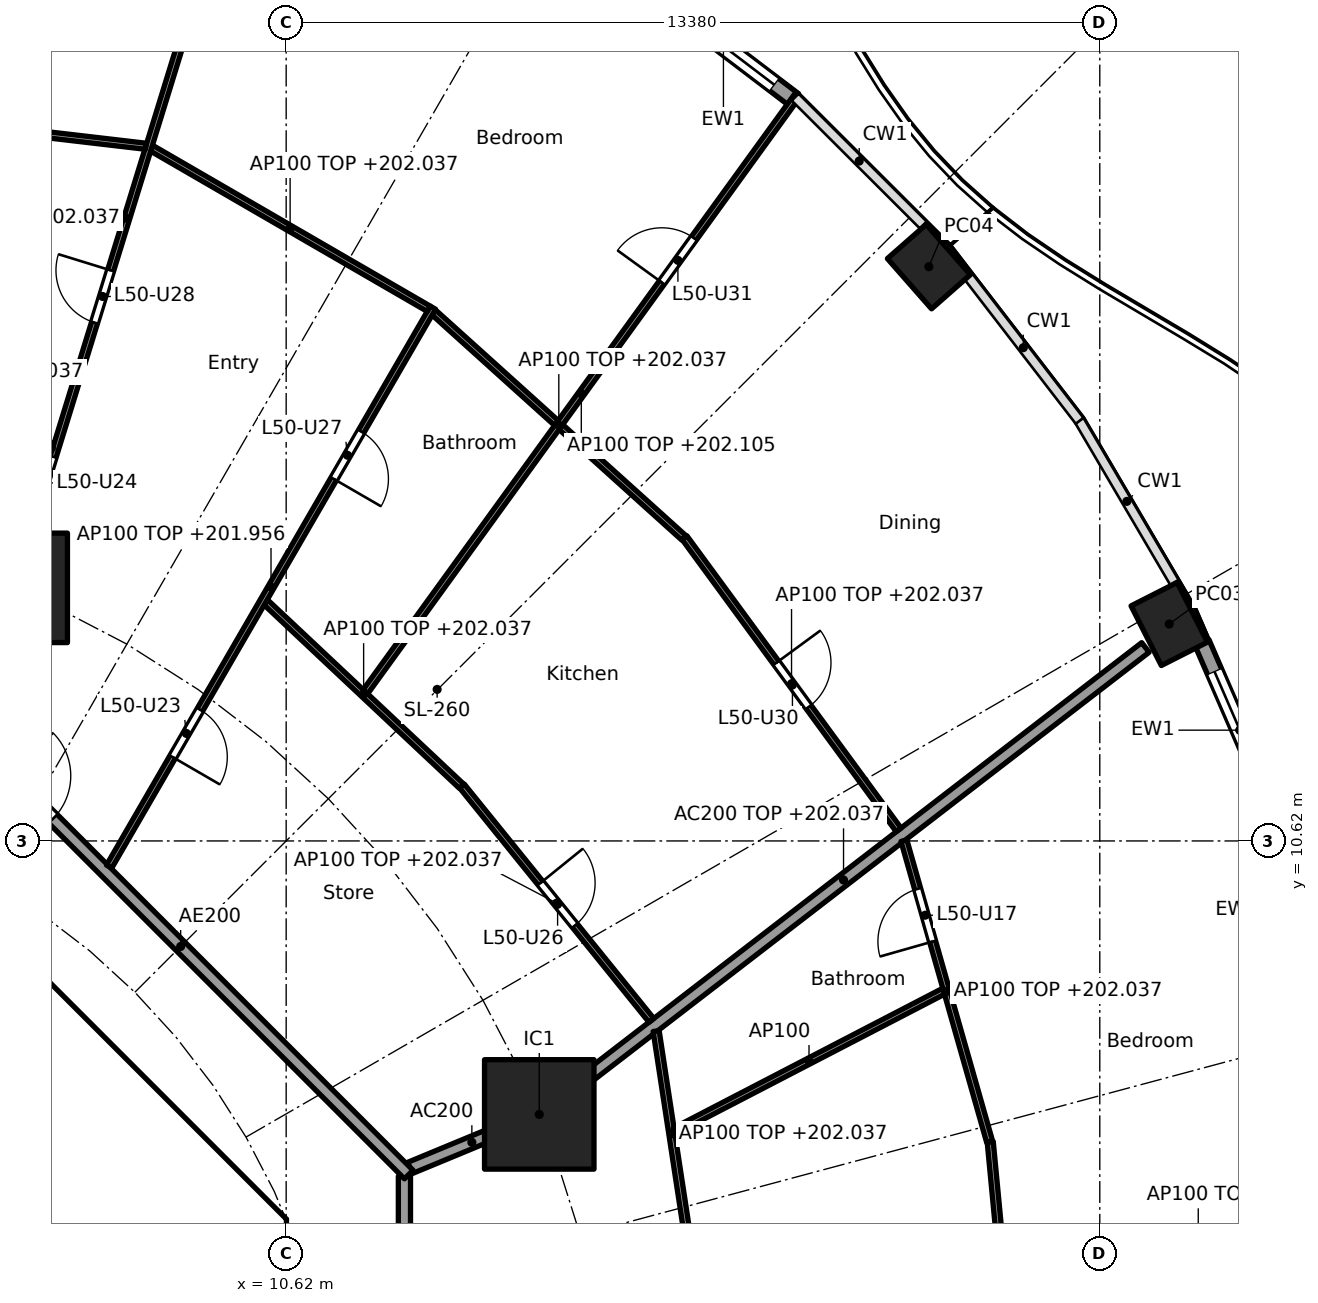
"""IFC4 building model, lengths in metres.
Left out: names, types, materials, properties, quantities, classifications, styles, units other than length and angle.
Written with IfcOpenShell. Run it as: python <this file> out.ifc"""

import sys

from ifc_helpers import new_model, si_unit, direction, frame, frame_2d, origin, origin_2d, place, context, subcontext, project, spatial, polyline, rectangle, hollow_rectangle, outline, extrude, element, fill, save


model = new_model("IFC4")
c1 = context("Model", 3, precision=1e-05, world=origin(), true_north=direction((0.0, 1.0)))
c2 = subcontext(c1, "Body", "Model", "MODEL_VIEW")
j1 = project(units=[si_unit("LENGTHUNIT", "METRE"), si_unit("PLANEANGLEUNIT", "RADIAN")], contexts=[c1])
p1 = place(None, origin())
s1 = spatial("IfcSite", under=j1, at=p1, CompositionType="ELEMENT")
p2 = place(p1, origin())
s2 = spatial("IfcBuilding", under=s1, at=p2, CompositionType="ELEMENT")
p3 = place(p2, frame((0.0, 0.0, 199.2)))
s3 = spatial("IfcBuildingStorey", under=s2, at=p3, CompositionType="ELEMENT", Elevation=199.2)
for number, where, z_axis, x_axis in (
    (1, (25.142, 14.188, 0.0), (0.0, 0.0, 1.0), (-0.452, 0.892, 0.0)),
    (2, (21.189, 20.064, 0.0), (0.0, 0.0, 1.0), (-0.66, 0.751, 0.0)),
):
    element("IfcColumn", number, at=place(p3, frame(where, z_axis=z_axis, x_axis=x_axis)), inside=s3, PredefinedType="COLUMN", context=c2, shape_type="SweptSolid", body=[
        extrude(hollow_rectangle(XDim=1.1, YDim=0.85, WallThickness=0.036, at=origin_2d()), origin(), (0.0, 0.0, 1.0), 3.7),
    ])
for number, where, z_axis, x_axis in (
    (3, (14.782, 6.123, 0.0), (0.0, 0.0, 1.0), (1.0, 0.0, 0.0)),
    (4, (6.123, 14.782, 0.0), (0.0, 0.0, 1.0), (1.0, 0.0, 0.0)),
):
    element("IfcColumn", number, at=place(p3, frame(where, z_axis=z_axis, x_axis=x_axis)), inside=s3, PredefinedType="COLUMN", context=c2, shape_type="SweptSolid", body=[
        extrude(rectangle(XDim=1.8, YDim=1.8, at=origin_2d()), origin(), (0.0, 0.0, 1.0), 3.7),
    ])
p4 = place(p3, frame((25.679, 13.883, 0.0), z_axis=(0.0, 0.0, 1.0), x_axis=(0.397620521824, -0.917549955384, 0.0)))
e5 = element("IfcWall", 5, at=p4, inside=s3, PredefinedType="SOLIDWALL", context=c2, shape_type="SweptSolid", body=[
    extrude(rectangle(XDim=3.142, YDim=0.25, at=frame_2d((1.571, 0.0))), origin(), (0.0, 0.0, 1.0), 3.44),
])
p5 = place(p4, frame((0.521, 0.0, 0.0)))
e6 = element("IfcOpeningElement", 6, at=p5, cuts=e5, PredefinedType="OPENING", context=c2, shape_type="SweptSolid", body=[
    extrude(rectangle(XDim=2.1, YDim=2.4, at=frame_2d((1.05, 1.2))), frame((0.0, 0.135, 0.0), z_axis=(0.0, -1.0, 0.0), x_axis=(1.0, 0.0, 0.0)), (0.0, 0.0, 1.0), 0.27),
])
p6 = place(p3, frame((16.65, 24.574, 0.0), z_axis=(0.0, 0.0, 1.0), x_axis=(0.796055733703, -0.60522332146, 0.0)))
e7 = element("IfcWall", 7, at=p6, inside=s3, PredefinedType="SOLIDWALL", context=c2, shape_type="SweptSolid", body=[
    extrude(rectangle(XDim=2.917, YDim=0.25, at=frame_2d((1.458, 0.0))), origin(), (0.0, 0.0, 1.0), 3.44),
])
p7 = place(p6, frame((0.408, 0.0, 0.0)))
e8 = element("IfcOpeningElement", 8, at=p7, cuts=e7, PredefinedType="OPENING", context=c2, shape_type="SweptSolid", body=[
    extrude(rectangle(XDim=2.1, YDim=2.4, at=frame_2d((1.05, 1.2))), frame((0.0, 0.135, 0.0), z_axis=(0.0, -1.0, 0.0), x_axis=(1.0, 0.0, 0.0)), (0.0, 0.0, 1.0), 0.27),
])
p8 = place(p3, frame((9.988, 4.613, 0.0), z_axis=(0.0, 0.0, 1.0), x_axis=(-0.707106781187, 0.707106781187, 0.0)))
e9 = element("IfcWall", 9, at=p8, inside=s3, PredefinedType="SHEAR", context=c2, shape_type="SweptSolid", body=[
    extrude(rectangle(XDim=7.602, YDim=0.6, at=frame_2d((3.801, 0.0))), origin(), (0.0, 0.0, 1.0), 3.44),
])
p9 = place(p8, frame((3.201, 0.0, 0.0)))
e10 = element("IfcOpeningElement", 10, at=p9, cuts=e9, PredefinedType="OPENING", context=c2, shape_type="SweptSolid", body=[
    extrude(rectangle(XDim=1.2, YDim=2.1, at=frame_2d((0.6, 1.05))), frame((0.0, 0.31, 0.0), z_axis=(0.0, -1.0, 0.0), x_axis=(1.0, 0.0, 0.0)), (0.0, 0.0, 1.0), 0.62),
])
p10 = place(p3, origin())
e11 = element("IfcWall", 11, at=p10, inside=s3, PredefinedType="SHEAR", context=c2, shape_type="SweptSolid", body=[
    extrude(outline(polyline([(9.776, -4.401), (10.025, -4.152), (10.025, -3.801), (10.025, 4.152), (9.776, 4.401), (10.2, 4.825), (10.625, 4.401), (10.625, -4.401), (10.2, -4.825), (9.776, -4.401)])), origin(), (0.0, 0.0, 1.0), 3.44),
])
p11 = place(p3, frame((12.657, 5.243, 0.0), z_axis=(0.0, 0.0, 1.0), x_axis=(0.92383017907, 0.382802560388, 0.0)))
e12 = element("IfcWall", 12, at=p11, inside=s3, PredefinedType="PARTITIONING", context=c2, shape_type="SweptSolid", body=[
    extrude(rectangle(XDim=2.2, YDim=0.2, at=frame_2d((1.1, 0.0))), origin(), (0.0, 0.0, 1.0), 3.44),
])
p12 = place(p3, frame((14.822, 6.154, 0.0), z_axis=(0.0, 0.0, 1.0), x_axis=(0.792203056092, 0.610257583254, 0.0)))
e13 = element("IfcWall", 13, at=p12, inside=s3, PredefinedType="PARTITIONING", context=c2, shape_type="SweptSolid", body=[
    extrude(rectangle(XDim=12.533, YDim=0.2, at=frame_2d((6.266, 0.0))), origin(), (0.0, 0.0, 1.0), 2.837),
])
p13 = place(p3, frame((12.565, -5.104, 0.0), z_axis=(0.0, 0.0, 1.0), x_axis=(0.0, 1.0, 0.0)))
e14 = element("IfcWall", 14, at=p13, inside=s3, PredefinedType="PARTITIONING", context=c2, shape_type="SweptSolid", body=[
    extrude(rectangle(XDim=10.209, YDim=0.2, at=frame_2d((5.104, 0.0))), origin(), (0.0, 0.0, 1.0), 3.44),
])
p14 = place(p3, frame((12.635, 5.134, 0.0), z_axis=(0.0, 0.0, 1.0), x_axis=(-0.707106781187, 0.707106781187, 0.0)))
e15 = element("IfcWall", 15, at=p14, inside=s3, PredefinedType="PARTITIONING", context=c2, shape_type="SweptSolid", body=[
    extrude(rectangle(XDim=10.609, YDim=0.2, at=frame_2d((5.305, 0.0))), origin(), (0.0, 0.0, 1.0), 3.44),
])
p15 = place(p14, frame((8.274, 0.0, 0.0)))
e16 = element("IfcOpeningElement", 16, at=p15, cuts=e15, PredefinedType="OPENING", context=c2, shape_type="SweptSolid", body=[
    extrude(rectangle(XDim=1.0, YDim=2.1, at=frame_2d((0.5, 1.05))), frame((0.0, 0.11, 0.0), z_axis=(0.0, -1.0, 0.0), x_axis=(1.0, 0.0, 0.0)), (0.0, 0.0, 1.0), 0.22),
])
p16 = place(p3, frame((22.734, 0.05, 0.0), z_axis=(0.0, 0.0, 1.0), x_axis=(-0.0949274088, 0.995484197292, 0.0)))
e17 = element("IfcWall", 17, at=p16, inside=s3, PredefinedType="PARTITIONING", context=c2, shape_type="SweptSolid", body=[
    extrude(rectangle(XDim=5.648, YDim=0.1, at=frame_2d((2.824, 0.0))), origin(), (0.0, 0.0, 1.0), 2.837),
])
p17 = place(p16, frame((0.937, 0.0, 0.0)))
e18 = element("IfcOpeningElement", 18, at=p17, cuts=e17, PredefinedType="OPENING", context=c2, shape_type="SweptSolid", body=[
    extrude(rectangle(XDim=0.9, YDim=2.1, at=frame_2d((0.45, 1.05))), frame((0.0, 0.06, 0.0), z_axis=(0.0, -1.0, 0.0), x_axis=(1.0, 0.0, 0.0)), (0.0, 0.0, 1.0), 0.12),
])
p18 = place(p3, frame((17.221, 4.113, 0.0), z_axis=(0.0, 0.0, 1.0), x_axis=(-0.1510806336, 0.988521442434, 0.0)))
e19 = element("IfcWall", 19, at=p18, inside=s3, PredefinedType="PARTITIONING", context=c2, shape_type="SweptSolid", body=[
    extrude(rectangle(XDim=3.419, YDim=0.1, at=frame_2d((1.71, 0.0))), origin(), (0.0, 0.0, 1.0), 2.837),
])
p19 = place(p3, frame((22.189, 5.67, 0.0), z_axis=(0.0, 0.0, 1.0), x_axis=(-0.273819702124, 0.961781040949, 0.0)))
e20 = element("IfcWall", 20, at=p19, inside=s3, PredefinedType="PARTITIONING", context=c2, shape_type="SweptSolid", body=[
    extrude(rectangle(XDim=5.152, YDim=0.1, at=frame_2d((2.576, 0.0))), origin(), (0.0, 0.0, 1.0), 2.837),
])
p20 = place(p19, frame((3.426, 0.0, 0.0)))
e21 = element("IfcOpeningElement", 21, at=p20, cuts=e20, PredefinedType="OPENING", context=c2, shape_type="SweptSolid", body=[
    extrude(rectangle(XDim=0.9, YDim=2.1, at=frame_2d((0.45, 1.05))), frame((0.0, 0.06, 0.0), z_axis=(0.0, -1.0, 0.0), x_axis=(1.0, 0.0, 0.0)), (0.0, 0.0, 1.0), 0.12),
])
p21 = place(p3, frame((17.003, 5.851, 0.0), z_axis=(0.0, 0.0, 1.0), x_axis=(0.887654549419, 0.460509935719, 0.0)))
e22 = element("IfcWall", 22, at=p21, inside=s3, PredefinedType="PARTITIONING", context=c2, shape_type="SweptSolid", body=[
    extrude(rectangle(XDim=4.99, YDim=0.1, at=frame_2d((2.495, 0.0))), origin(), (0.0, 0.0, 1.0), 3.44),
])
p22 = place(p3, frame((16.626, 7.67, 0.0), z_axis=(0.0, 0.0, 1.0), x_axis=(-0.628764602857, 0.777595700987, 0.0)))
e23 = element("IfcWall", 23, at=p22, inside=s3, PredefinedType="PARTITIONING", context=c2, shape_type="SweptSolid", body=[
    extrude(rectangle(XDim=4.957, YDim=0.1, at=frame_2d((2.479, 0.0))), origin(), (0.0, 0.0, 1.0), 2.837),
])
p23 = place(p22, frame((2.004, 0.0, 0.0)))
e24 = element("IfcOpeningElement", 24, at=p23, cuts=e23, PredefinedType="OPENING", context=c2, shape_type="SweptSolid", body=[
    extrude(rectangle(XDim=0.9, YDim=2.1, at=frame_2d((0.45, 1.05))), frame((0.0, 0.06, 0.0), z_axis=(0.0, -1.0, 0.0), x_axis=(1.0, 0.0, 0.0)), (0.0, 0.0, 1.0), 0.12),
])
p24 = place(p3, frame((20.692, 10.802, 0.0), z_axis=(0.0, 0.0, 1.0), x_axis=(-0.591122127251, 0.806582066918, 0.0)))
e25 = element("IfcWall", 25, at=p24, inside=s3, PredefinedType="PARTITIONING", context=c2, shape_type="SweptSolid", body=[
    extrude(rectangle(XDim=5.96, YDim=0.1, at=frame_2d((2.98, 0.0))), origin(), (0.0, 0.0, 1.0), 2.837),
])
p25 = place(p24, frame((2.505, 0.0, 0.0)))
e26 = element("IfcOpeningElement", 26, at=p25, cuts=e25, PredefinedType="OPENING", context=c2, shape_type="SweptSolid", body=[
    extrude(rectangle(XDim=0.9, YDim=2.1, at=frame_2d((0.45, 1.05))), frame((0.0, 0.06, 0.0), z_axis=(0.0, -1.0, 0.0), x_axis=(1.0, 0.0, 0.0)), (0.0, 0.0, 1.0), 0.12),
])
p26 = place(p3, frame((13.504, 11.52, 0.0), z_axis=(0.0, 0.0, 1.0), x_axis=(-0.728885663674, 0.684635442619, 0.0)))
e27 = element("IfcWall", 27, at=p26, inside=s3, PredefinedType="PARTITIONING", context=c2, shape_type="SweptSolid", body=[
    extrude(rectangle(XDim=4.419, YDim=0.1, at=frame_2d((2.21, 0.0))), origin(), (0.0, 0.0, 1.0), 2.837),
])
p27 = place(p3, frame((17.162, 15.603, 0.0), z_axis=(0.0, 0.0, 1.0), x_axis=(-0.742790086539, 0.66952437397, 0.0)))
e28 = element("IfcWall", 28, at=p27, inside=s3, PredefinedType="PARTITIONING", context=c2, shape_type="SweptSolid", body=[
    extrude(rectangle(XDim=5.542, YDim=0.1, at=frame_2d((2.771, 0.0))), origin(), (0.0, 0.0, 1.0), 2.837),
])
p28 = place(p3, frame((11.923, 13.073, 0.0), z_axis=(0.0, 0.0, 1.0), x_axis=(0.586643945506, 0.809844973561, 0.0)))
e29 = element("IfcWall", 29, at=p28, inside=s3, PredefinedType="PARTITIONING", context=c2, shape_type="SweptSolid", body=[
    extrude(rectangle(XDim=12.104, YDim=0.1, at=frame_2d((6.052, 0.0))), origin(), (0.0, 0.0, 1.0), 2.905),
])
p29 = place(p28, frame((8.31, 0.0, 0.0)))
e30 = element("IfcOpeningElement", 30, at=p29, cuts=e29, PredefinedType="OPENING", context=c2, shape_type="SweptSolid", body=[
    extrude(rectangle(XDim=0.9, YDim=2.1, at=frame_2d((0.45, 1.05))), frame((0.0, 0.06, 0.0), z_axis=(0.0, -1.0, 0.0), x_axis=(1.0, 0.0, 0.0)), (0.0, 0.0, 1.0), 0.12),
])
p30 = place(p3, frame((7.708, 10.198, 0.0), z_axis=(0.0, 0.0, 1.0), x_axis=(0.501288100085, 0.865280440501, 0.0)))
e31 = element("IfcWall", 31, at=p30, inside=s3, PredefinedType="PARTITIONING", context=c2, shape_type="SweptSolid", body=[
    extrude(rectangle(XDim=10.623, YDim=0.1, at=frame_2d((5.312, 0.0))), origin(), (0.0, 0.0, 1.0), 2.756),
])
p31 = place(p30, frame((2.082, 0.0, 0.0)))
e32 = element("IfcOpeningElement", 32, at=p31, cuts=e31, PredefinedType="OPENING", context=c2, shape_type="SweptSolid", body=[
    extrude(rectangle(XDim=0.9, YDim=2.1, at=frame_2d((0.45, 1.05))), frame((0.0, 0.06, 0.0), z_axis=(0.0, -1.0, 0.0), x_axis=(1.0, 0.0, 0.0)), (0.0, 0.0, 1.0), 0.12),
])
p32 = place(p30, frame((7.369, 0.0, 0.0)))
e33 = element("IfcOpeningElement", 33, at=p32, cuts=e31, PredefinedType="OPENING", context=c2, shape_type="SweptSolid", body=[
    extrude(rectangle(XDim=0.9, YDim=2.1, at=frame_2d((0.45, 1.05))), frame((0.0, 0.06, 0.0), z_axis=(0.0, -1.0, 0.0), x_axis=(1.0, 0.0, 0.0)), (0.0, 0.0, 1.0), 0.12),
])
p33 = place(p3, frame((12.965, 19.371, 0.0), z_axis=(0.0, 0.0, 1.0), x_axis=(-0.865277177388, 0.501293732547, 0.0)))
e34 = element("IfcWall", 34, at=p33, inside=s3, PredefinedType="PARTITIONING", context=c2, shape_type="SweptSolid", body=[
    extrude(rectangle(XDim=5.27, YDim=0.1, at=frame_2d((2.635, 0.0))), origin(), (0.0, 0.0, 1.0), 2.837),
])
p34 = place(p3, frame((6.138, 14.83, 0.0), z_axis=(0.0, 0.0, 1.0), x_axis=(0.294818517221, 0.955553264818, 0.0)))
e35 = element("IfcWall", 35, at=p34, inside=s3, PredefinedType="PARTITIONING", context=c2, shape_type="SweptSolid", body=[
    extrude(rectangle(XDim=12.619, YDim=0.1, at=frame_2d((6.31, 0.0))), origin(), (0.0, 0.0, 1.0), 2.837),
])
p35 = place(p34, frame((1.306, 0.0, 0.0)))
e36 = element("IfcOpeningElement", 36, at=p35, cuts=e35, PredefinedType="OPENING", context=c2, shape_type="SweptSolid", body=[
    extrude(rectangle(XDim=0.9, YDim=2.1, at=frame_2d((0.45, 1.05))), frame((0.0, 0.06, 0.0), z_axis=(0.0, -1.0, 0.0), x_axis=(1.0, 0.0, 0.0)), (0.0, 0.0, 1.0), 0.12),
])
p36 = place(p34, frame((4.515, 0.0, 0.0)))
e37 = element("IfcOpeningElement", 37, at=p36, cuts=e35, PredefinedType="OPENING", context=c2, shape_type="SweptSolid", body=[
    extrude(rectangle(XDim=0.9, YDim=2.1, at=frame_2d((0.45, 1.05))), frame((0.0, 0.06, 0.0), z_axis=(0.0, -1.0, 0.0), x_axis=(1.0, 0.0, 0.0)), (0.0, 0.0, 1.0), 0.12),
])
p37 = place(p3, frame((6.791, 17.113, 0.0), z_axis=(0.0, 0.0, 1.0), x_axis=(-0.997077117727, 0.07640171009, 0.0)))
e38 = element("IfcWall", 38, at=p37, inside=s3, PredefinedType="PARTITIONING", context=c2, shape_type="SweptSolid", body=[
    extrude(rectangle(XDim=4.56, YDim=0.1, at=frame_2d((2.28, 0.0))), origin(), (0.0, 0.0, 1.0), 2.837),
])
p38 = place(p3, frame((8.312, 22.044, 0.0), z_axis=(0.0, 0.0, 1.0), x_axis=(-0.993245806382, 0.1160291692, 0.0)))
e39 = element("IfcWall", 39, at=p38, inside=s3, PredefinedType="PARTITIONING", context=c2, shape_type="SweptSolid", body=[
    extrude(rectangle(XDim=5.408, YDim=0.1, at=frame_2d((2.704, 0.0))), origin(), (0.0, 0.0, 1.0), 2.837),
])
p39 = place(p38, frame((2.254, 0.0, 0.0)))
e40 = element("IfcOpeningElement", 40, at=p39, cuts=e39, PredefinedType="OPENING", context=c2, shape_type="SweptSolid", body=[
    extrude(rectangle(XDim=0.9, YDim=2.1, at=frame_2d((0.45, 1.05))), frame((0.0, 0.06, 0.0), z_axis=(0.0, -1.0, 0.0), x_axis=(1.0, 0.0, 0.0)), (0.0, 0.0, 1.0), 0.12),
])
p40 = place(p5, origin())
e41 = element("IfcDoor", 41, at=p40, inside=s3, OperationType="SLIDING_TO_LEFT", PredefinedType="DOOR", context=c2, shape_type="SweptSolid", body=[
    extrude(rectangle(XDim=2.1, YDim=2.4, at=frame_2d((1.05, 1.2))), frame((0.0, 0.025, 0.0), z_axis=(0.0, -1.0, 0.0), x_axis=(1.0, 0.0, 0.0)), (0.0, 0.0, 1.0), 0.05),
])
fill(e6, e41)
p41 = place(p7, origin())
e42 = element("IfcDoor", 42, at=p41, inside=s3, OperationType="SLIDING_TO_LEFT", PredefinedType="DOOR", context=c2, shape_type="SweptSolid", body=[
    extrude(rectangle(XDim=2.1, YDim=2.4, at=frame_2d((1.05, 1.2))), frame((0.0, 0.025, 0.0), z_axis=(0.0, -1.0, 0.0), x_axis=(1.0, 0.0, 0.0)), (0.0, 0.0, 1.0), 0.05),
])
fill(e8, e42)
p42 = place(p9, origin())
e43 = element("IfcDoor", 43, at=p42, inside=s3, OperationType="SINGLE_SWING_RIGHT", PredefinedType="DOOR", context=c2, shape_type="SweptSolid", body=[
    extrude(rectangle(XDim=1.2, YDim=2.1, at=frame_2d((0.6, 1.05))), frame((0.0, 0.025, 0.0), z_axis=(0.0, -1.0, 0.0), x_axis=(1.0, 0.0, 0.0)), (0.0, 0.0, 1.0), 0.05),
])
fill(e10, e43)
p43 = place(p20, origin())
e44 = element("IfcDoor", 44, at=p43, inside=s3, OperationType="SINGLE_SWING_LEFT", PredefinedType="DOOR", context=c2, shape_type="SweptSolid", body=[
    extrude(rectangle(XDim=0.9, YDim=2.1, at=frame_2d((0.45, 1.05))), frame((0.0, 0.025, 0.0), z_axis=(0.0, -1.0, 0.0), x_axis=(1.0, 0.0, 0.0)), (0.0, 0.0, 1.0), 0.05),
])
fill(e21, e44)
p44 = place(p15, frame((1.0, 0.0, 0.0), x_axis=(-1.0, 0.0, 0.0)))
e45 = element("IfcDoor", 45, at=p44, inside=s3, OperationType="SINGLE_SWING_LEFT", PredefinedType="DOOR", context=c2, shape_type="SweptSolid", body=[
    extrude(rectangle(XDim=1.0, YDim=2.1, at=frame_2d((0.5, 1.05))), frame((0.0, 0.025, 0.0), z_axis=(0.0, -1.0, 0.0), x_axis=(1.0, 0.0, 0.0)), (0.0, 0.0, 1.0), 0.05),
])
fill(e16, e45)
p45 = place(p31, frame((0.9, 0.0, 0.0), x_axis=(-1.0, 0.0, 0.0)))
e46 = element("IfcDoor", 46, at=p45, inside=s3, OperationType="SINGLE_SWING_RIGHT", PredefinedType="DOOR", context=c2, shape_type="SweptSolid", body=[
    extrude(rectangle(XDim=0.9, YDim=2.1, at=frame_2d((0.45, 1.05))), frame((0.0, 0.025, 0.0), z_axis=(0.0, -1.0, 0.0), x_axis=(1.0, 0.0, 0.0)), (0.0, 0.0, 1.0), 0.05),
])
fill(e32, e46)
p46 = place(p35, origin())
e47 = element("IfcDoor", 47, at=p46, inside=s3, OperationType="SINGLE_SWING_RIGHT", PredefinedType="DOOR", context=c2, shape_type="SweptSolid", body=[
    extrude(rectangle(XDim=0.9, YDim=2.1, at=frame_2d((0.45, 1.05))), frame((0.0, 0.025, 0.0), z_axis=(0.0, -1.0, 0.0), x_axis=(1.0, 0.0, 0.0)), (0.0, 0.0, 1.0), 0.05),
])
fill(e36, e47)
p47 = place(p23, frame((0.9, 0.0, 0.0), x_axis=(-1.0, 0.0, 0.0)))
e48 = element("IfcDoor", 48, at=p47, inside=s3, OperationType="SINGLE_SWING_LEFT", PredefinedType="DOOR", context=c2, shape_type="SweptSolid", body=[
    extrude(rectangle(XDim=0.9, YDim=2.1, at=frame_2d((0.45, 1.05))), frame((0.0, 0.025, 0.0), z_axis=(0.0, -1.0, 0.0), x_axis=(1.0, 0.0, 0.0)), (0.0, 0.0, 1.0), 0.05),
])
fill(e24, e48)
p48 = place(p32, frame((0.9, 0.0, 0.0), x_axis=(-1.0, 0.0, 0.0)))
e49 = element("IfcDoor", 49, at=p48, inside=s3, OperationType="SINGLE_SWING_RIGHT", PredefinedType="DOOR", context=c2, shape_type="SweptSolid", body=[
    extrude(rectangle(XDim=0.9, YDim=2.1, at=frame_2d((0.45, 1.05))), frame((0.0, 0.025, 0.0), z_axis=(0.0, -1.0, 0.0), x_axis=(1.0, 0.0, 0.0)), (0.0, 0.0, 1.0), 0.05),
])
fill(e33, e49)
p49 = place(p36, origin())
e50 = element("IfcDoor", 50, at=p49, inside=s3, OperationType="SINGLE_SWING_RIGHT", PredefinedType="DOOR", context=c2, shape_type="SweptSolid", body=[
    extrude(rectangle(XDim=0.9, YDim=2.1, at=frame_2d((0.45, 1.05))), frame((0.0, 0.025, 0.0), z_axis=(0.0, -1.0, 0.0), x_axis=(1.0, 0.0, 0.0)), (0.0, 0.0, 1.0), 0.05),
])
fill(e37, e50)
p50 = place(p25, frame((0.9, 0.0, 0.0), x_axis=(-1.0, 0.0, 0.0)))
e51 = element("IfcDoor", 51, at=p50, inside=s3, OperationType="SINGLE_SWING_LEFT", PredefinedType="DOOR", context=c2, shape_type="SweptSolid", body=[
    extrude(rectangle(XDim=0.9, YDim=2.1, at=frame_2d((0.45, 1.05))), frame((0.0, 0.025, 0.0), z_axis=(0.0, -1.0, 0.0), x_axis=(1.0, 0.0, 0.0)), (0.0, 0.0, 1.0), 0.05),
])
fill(e26, e51)
p51 = place(p29, origin())
e52 = element("IfcDoor", 52, at=p51, inside=s3, OperationType="SINGLE_SWING_LEFT", PredefinedType="DOOR", context=c2, shape_type="SweptSolid", body=[
    extrude(rectangle(XDim=0.9, YDim=2.1, at=frame_2d((0.45, 1.05))), frame((0.0, 0.025, 0.0), z_axis=(0.0, -1.0, 0.0), x_axis=(1.0, 0.0, 0.0)), (0.0, 0.0, 1.0), 0.05),
])
fill(e30, e52)
save(model, sys.argv[1])
